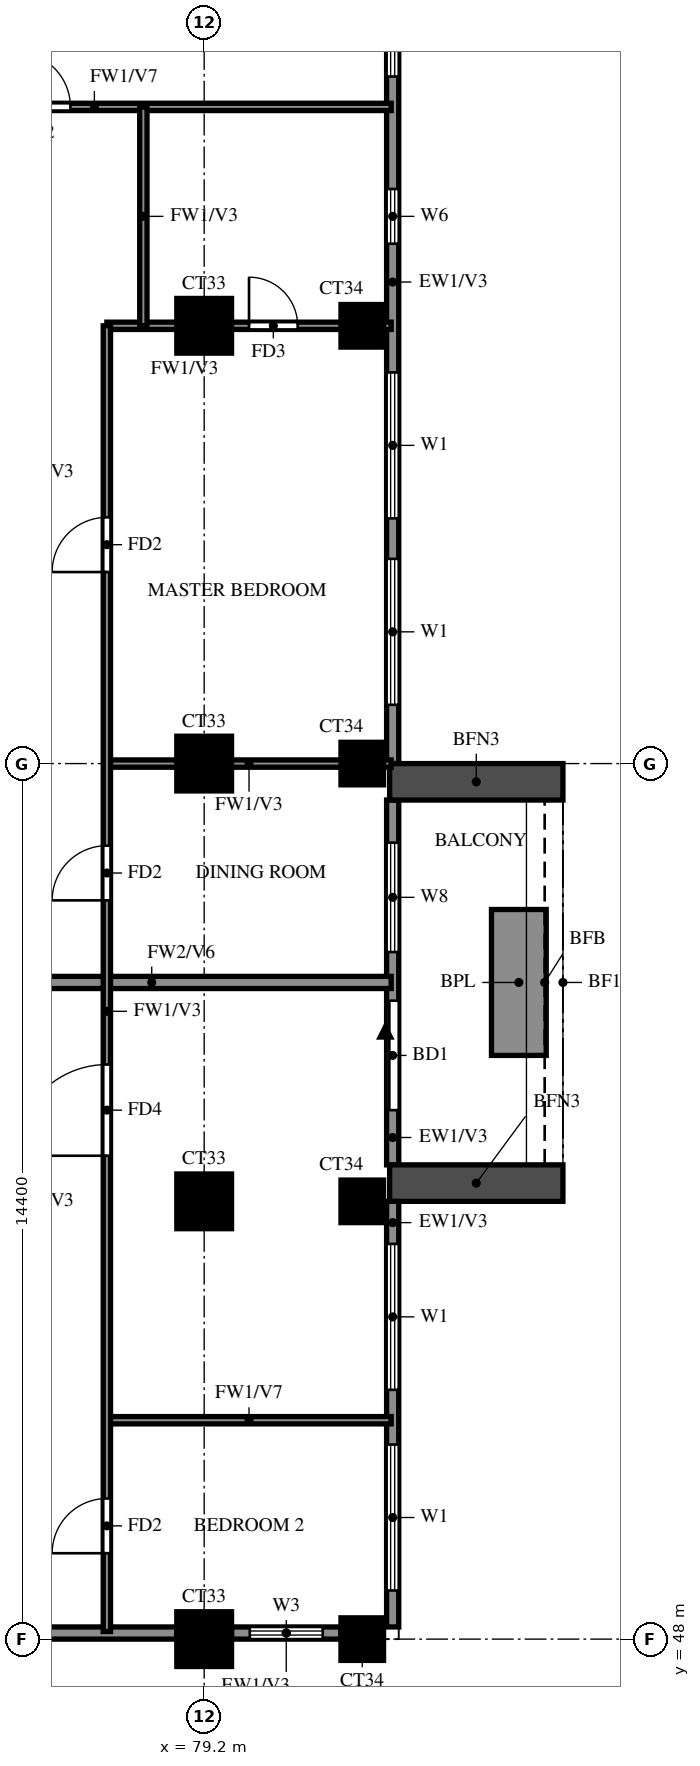
"""IFC4 building model, lengths in metres.
Left out: names, types, materials, properties, quantities, classifications, styles, units other than length and angle.
Written with IfcOpenShell. Run it as: python <this file> out.ifc"""

import sys

from ifc_helpers import new_model, si_unit, direction, frame, frame_2d, origin, origin_2d, place, context, subcontext, project, spatial, rectangle, extrude, source, transform, mapped, element, fill, save


model = new_model("IFC4")
c1 = context("Model", 3, precision=1e-05, world=origin(), true_north=direction((0.0, 1.0)))
c2 = subcontext(c1, "Body", "Model", "MODEL_VIEW")
j1 = project(units=[si_unit("LENGTHUNIT", "METRE"), si_unit("PLANEANGLEUNIT", "RADIAN")], contexts=[c1])
p1 = place(None, origin())
s1 = spatial("IfcSite", under=j1, at=p1, CompositionType="ELEMENT")
p2 = place(p1, origin())
s2 = spatial("IfcBuilding", under=s1, at=p2, CompositionType="ELEMENT")
p3 = place(p2, frame((0.0, 0.0, 218.5)))
s3 = spatial("IfcBuildingStorey", under=s2, at=p3, CompositionType="ELEMENT", Elevation=218.5)
m1 = source(origin(), c2, "Body", "SweptSolid", [
    extrude(rectangle(XDim=0.9, YDim=0.9, at=origin_2d()), origin(), (0.0, 0.0, 1.0), 3.22),
])
p4 = place(p3, frame((79.2, 48.0, 0.0), z_axis=(0.0, 0.0, 1.0), x_axis=(1.0, 0.0, 0.0)))
e1 = element("IfcColumn", 1, at=p4, inside=s3, PredefinedType="COLUMN", context=c2, shape_type="MappedRepresentation", body=[
    mapped(m1, transform((0.0, 0.0, 0.0))),
])
m2 = source(origin(), c2, "Body", "SweptSolid", [
    extrude(rectangle(XDim=0.7, YDim=0.7, at=origin_2d()), origin(), (0.0, 0.0, 1.0), 3.22),
])
p5 = place(p3, frame((81.8, 48.0, 0.0), z_axis=(0.0, 0.0, 1.0), x_axis=(1.0, 0.0, 0.0)))
e2 = element("IfcColumn", 2, at=p5, inside=s3, PredefinedType="COLUMN", context=c2, shape_type="MappedRepresentation", body=[
    mapped(m2, transform((0.0, 0.0, 0.0))),
])
p6 = place(p3, frame((79.2, 55.2, 0.0), z_axis=(0.0, 0.0, 1.0), x_axis=(1.0, 0.0, 0.0)))
e3 = element("IfcColumn", 3, at=p6, inside=s3, PredefinedType="COLUMN", context=c2, shape_type="MappedRepresentation", body=[
    mapped(m1, transform((0.0, 0.0, 0.0))),
])
p7 = place(p3, frame((81.8, 55.2, 0.0), z_axis=(0.0, 0.0, 1.0), x_axis=(1.0, 0.0, 0.0)))
e4 = element("IfcColumn", 4, at=p7, inside=s3, PredefinedType="COLUMN", context=c2, shape_type="MappedRepresentation", body=[
    mapped(m2, transform((0.0, 0.0, 0.0))),
])
p8 = place(p3, frame((79.2, 62.4, 0.0), z_axis=(0.0, 0.0, 1.0), x_axis=(1.0, 0.0, 0.0)))
e5 = element("IfcColumn", 5, at=p8, inside=s3, PredefinedType="COLUMN", context=c2, shape_type="MappedRepresentation", body=[
    mapped(m1, transform((0.0, 0.0, 0.0))),
])
p9 = place(p3, frame((81.8, 62.4, 0.0), z_axis=(0.0, 0.0, 1.0), x_axis=(1.0, 0.0, 0.0)))
e6 = element("IfcColumn", 6, at=p9, inside=s3, PredefinedType="COLUMN", context=c2, shape_type="MappedRepresentation", body=[
    mapped(m2, transform((0.0, 0.0, 0.0))),
])
p10 = place(p3, frame((79.2, 69.6, 0.0), z_axis=(0.0, 0.0, 1.0), x_axis=(1.0, 0.0, 0.0)))
e7 = element("IfcColumn", 7, at=p10, inside=s3, PredefinedType="COLUMN", context=c2, shape_type="MappedRepresentation", body=[
    mapped(m1, transform((0.0, 0.0, 0.0))),
])
p11 = place(p3, frame((81.8, 69.6, 0.0), z_axis=(0.0, 0.0, 1.0), x_axis=(1.0, 0.0, 0.0)))
e8 = element("IfcColumn", 8, at=p11, inside=s3, PredefinedType="COLUMN", context=c2, shape_type="MappedRepresentation", body=[
    mapped(m2, transform((0.0, 0.0, 0.0))),
])
p12 = place(p3, frame((81.907, 39.87, 0.0), z_axis=(0.0, 0.0, 1.0), x_axis=(-0.777936274417, 0.62834318087, 0.0)))
e9 = element("IfcWall", 9, at=p12, inside=s3, PredefinedType="SOLIDWALL", context=c2, shape_type="SweptSolid", body=[
    extrude(rectangle(XDim=13.099, YDim=0.2, at=frame_2d((6.549, 0.0))), origin(), (0.0, 0.0, 1.0), 3.22),
])
p13 = place(p12, frame((9.938, 0.0, 1.5)))
e10 = element("IfcOpeningElement", 10, at=p13, cuts=e9, PredefinedType="OPENING", context=c2, shape_type="SweptSolid", body=[
    extrude(rectangle(XDim=0.9, YDim=0.9, at=frame_2d((0.45, 0.45))), frame((0.0, 0.11, 0.0), z_axis=(0.0, -1.0, 0.0), x_axis=(1.0, 0.0, 0.0)), (0.0, 0.0, 1.0), 0.22),
])
p14 = place(p3, frame((71.987, 48.1, 0.0), z_axis=(0.0, 0.0, 1.0), x_axis=(1.0, 0.0, 0.0)))
e11 = element("IfcWall", 11, at=p14, inside=s3, PredefinedType="SOLIDWALL", context=c2, shape_type="SweptSolid", body=[
    extrude(rectangle(XDim=6.763, YDim=0.2, at=frame_2d((3.381, 0.0))), origin(), (0.0, 0.0, 1.0), 3.22),
])
p15 = place(p3, frame((79.65, 48.1, 0.0), z_axis=(0.0, 0.0, 1.0), x_axis=(1.0, 0.0, 0.0)))
e12 = element("IfcWall", 12, at=p15, inside=s3, PredefinedType="SOLIDWALL", context=c2, shape_type="SweptSolid", body=[
    extrude(rectangle(XDim=1.8, YDim=0.2, at=frame_2d((0.9, 0.0))), origin(), (0.0, 0.0, 1.0), 3.22),
])
p16 = place(p15, frame((0.3, 0.0, 0.6)))
e13 = element("IfcOpeningElement", 13, at=p16, cuts=e12, PredefinedType="OPENING", context=c2, shape_type="SweptSolid", body=[
    extrude(rectangle(XDim=1.2, YDim=2.4, at=frame_2d((0.6, 1.2))), frame((0.0, 0.11, 0.0), z_axis=(0.0, -1.0, 0.0), x_axis=(1.0, 0.0, 0.0)), (0.0, 0.0, 1.0), 0.22),
])
p17 = place(p3, frame((82.3, 48.2, 0.0), z_axis=(0.0, 0.0, 1.0), x_axis=(0.0, 1.0, 0.0)))
e14 = element("IfcWall", 14, at=p17, inside=s3, PredefinedType="SOLIDWALL", context=c2, shape_type="SweptSolid", body=[
    extrude(rectangle(XDim=7.0, YDim=0.2, at=frame_2d((3.5, 0.0))), origin(), (0.0, 0.0, 1.0), 3.22),
])
p18 = place(p17, frame((0.6, 0.0, 0.6)))
e15 = element("IfcOpeningElement", 15, at=p18, cuts=e14, PredefinedType="OPENING", context=c2, shape_type="SweptSolid", body=[
    extrude(rectangle(XDim=2.4, YDim=2.4, at=frame_2d((1.2, 1.2))), frame((0.0, 0.11, 0.0), z_axis=(0.0, -1.0, 0.0), x_axis=(1.0, 0.0, 0.0)), (0.0, 0.0, 1.0), 0.22),
])
p19 = place(p17, frame((3.9, 0.0, 0.6)))
e16 = element("IfcOpeningElement", 16, at=p19, cuts=e14, PredefinedType="OPENING", context=c2, shape_type="SweptSolid", body=[
    extrude(rectangle(XDim=2.4, YDim=2.4, at=frame_2d((1.2, 1.2))), frame((0.0, 0.11, 0.0), z_axis=(0.0, -1.0, 0.0), x_axis=(1.0, 0.0, 0.0)), (0.0, 0.0, 1.0), 0.22),
])
p20 = place(p3, frame((82.3, 55.8, 0.0), z_axis=(0.0, 0.0, 1.0), x_axis=(0.0, 1.0, 0.0)))
e17 = element("IfcWall", 17, at=p20, inside=s3, PredefinedType="SOLIDWALL", context=c2, shape_type="SweptSolid", body=[
    extrude(rectangle(XDim=6.0, YDim=0.2, at=frame_2d((3.0, 0.0))), origin(), (0.0, 0.0, 1.0), 3.22),
])
p21 = place(p20, frame((0.9, 0.0, 0.0)))
e18 = element("IfcOpeningElement", 18, at=p21, cuts=e17, PredefinedType="OPENING", context=c2, shape_type="SweptSolid", body=[
    extrude(rectangle(XDim=1.8, YDim=2.4, at=frame_2d((0.9, 1.2))), frame((0.0, 0.11, 0.0), z_axis=(0.0, -1.0, 0.0), x_axis=(1.0, 0.0, 0.0)), (0.0, 0.0, 1.0), 0.22),
])
p22 = place(p20, frame((3.5, 0.0, 0.6)))
e19 = element("IfcOpeningElement", 19, at=p22, cuts=e17, PredefinedType="OPENING", context=c2, shape_type="SweptSolid", body=[
    extrude(rectangle(XDim=1.8, YDim=2.4, at=frame_2d((0.9, 1.2))), frame((0.0, 0.11, 0.0), z_axis=(0.0, -1.0, 0.0), x_axis=(1.0, 0.0, 0.0)), (0.0, 0.0, 1.0), 0.22),
])
p23 = place(p3, frame((82.3, 62.4, 0.0), z_axis=(0.0, 0.0, 1.0), x_axis=(0.0, 1.0, 0.0)))
e20 = element("IfcWall", 20, at=p23, inside=s3, PredefinedType="SOLIDWALL", context=c2, shape_type="SweptSolid", body=[
    extrude(rectangle(XDim=14.4, YDim=0.2, at=frame_2d((7.2, 0.0))), origin(), (0.0, 0.0, 1.0), 3.22),
])
p24 = place(p23, frame((0.967, 0.0, 0.6)))
e21 = element("IfcOpeningElement", 21, at=p24, cuts=e20, PredefinedType="OPENING", context=c2, shape_type="SweptSolid", body=[
    extrude(rectangle(XDim=2.4, YDim=2.4, at=frame_2d((1.2, 1.2))), frame((0.0, 0.11, 0.0), z_axis=(0.0, -1.0, 0.0), x_axis=(1.0, 0.0, 0.0)), (0.0, 0.0, 1.0), 0.22),
])
p25 = place(p23, frame((4.033, 0.0, 0.6)))
e22 = element("IfcOpeningElement", 22, at=p25, cuts=e20, PredefinedType="OPENING", context=c2, shape_type="SweptSolid", body=[
    extrude(rectangle(XDim=2.4, YDim=2.4, at=frame_2d((1.2, 1.2))), frame((0.0, 0.11, 0.0), z_axis=(0.0, -1.0, 0.0), x_axis=(1.0, 0.0, 0.0)), (0.0, 0.0, 1.0), 0.22),
])
p26 = place(p23, frame((8.55, 0.0, 1.5)))
e23 = element("IfcOpeningElement", 23, at=p26, cuts=e20, PredefinedType="OPENING", context=c2, shape_type="SweptSolid", body=[
    extrude(rectangle(XDim=0.9, YDim=0.9, at=frame_2d((0.45, 0.45))), frame((0.0, 0.11, 0.0), z_axis=(0.0, -1.0, 0.0), x_axis=(1.0, 0.0, 0.0)), (0.0, 0.0, 1.0), 0.22),
])
p27 = place(p23, frame((11.3, 0.0, 0.6)))
e24 = element("IfcOpeningElement", 24, at=p27, cuts=e20, PredefinedType="OPENING", context=c2, shape_type="SweptSolid", body=[
    extrude(rectangle(XDim=2.4, YDim=2.4, at=frame_2d((1.2, 1.2))), frame((0.0, 0.11, 0.0), z_axis=(0.0, -1.0, 0.0), x_axis=(1.0, 0.0, 0.0)), (0.0, 0.0, 1.0), 0.22),
])
for number, where, z_axis, x_axis in (
    (25, (82.25, 55.5, 0.0), (0.0, 0.0, 1.0), (1.0, 0.0, 0.0)),
    (26, (82.25, 62.1, 0.0), (0.0, 0.0, 1.0), (1.0, 0.0, 0.0)),
):
    element("IfcWall", number, at=place(p3, frame(where, z_axis=z_axis, x_axis=x_axis)), inside=s3, PredefinedType="SOLIDWALL", context=c2, shape_type="SweptSolid", body=[
        extrude(rectangle(XDim=2.85, YDim=0.6, at=frame_2d((1.425, 0.0))), origin(), (0.0, 0.0, 1.0), 2.85),
    ])
p28 = place(p3, frame((84.375, 57.6, 0.0), z_axis=(0.0, 0.0, 1.0), x_axis=(0.0, 1.0, 0.0)))
e27 = element("IfcWall", 27, at=p28, inside=s3, PredefinedType="SOLIDWALL", context=c2, shape_type="SweptSolid", body=[
    extrude(rectangle(XDim=2.4, YDim=0.9, at=frame_2d((1.2, 0.0))), origin(), (0.0, 0.0, 1.0), 0.9),
])
p29 = place(p3, frame((74.4, 58.8, 0.0), z_axis=(0.0, 0.0, 1.0), x_axis=(1.0, 0.0, 0.0)))
e28 = element("IfcWall", 28, at=p29, inside=s3, PredefinedType="SOLIDWALL", context=c2, shape_type="SweptSolid", body=[
    extrude(rectangle(XDim=7.875, YDim=0.2, at=frame_2d((3.938, 0.0))), origin(), (0.0, 0.0, 1.0), 2.32),
])
p30 = place(p3, frame((77.6, 51.6, 0.0), z_axis=(0.0, 0.0, 1.0), x_axis=(1.0, 0.0, 0.0)))
e29 = element("IfcWall", 29, at=p30, inside=s3, PredefinedType="PARTITIONING", context=c2, shape_type="SweptSolid", body=[
    extrude(rectangle(XDim=4.675, YDim=0.12, at=frame_2d((2.337, 0.0))), origin(), (0.0, 0.0, 1.0), 2.32),
])
p31 = place(p3, frame((77.6, 62.4, 0.0), z_axis=(0.0, 0.0, 1.0), x_axis=(1.0, 0.0, 0.0)))
e30 = element("IfcWall", 30, at=p31, inside=s3, PredefinedType="PARTITIONING", context=c2, shape_type="SweptSolid", body=[
    extrude(rectangle(XDim=4.675, YDim=0.12, at=frame_2d((2.337, 0.0))), origin(), (0.0, 0.0, 1.0), 3.22),
])
p32 = place(p3, frame((77.6, 69.6, 0.0), z_axis=(0.0, 0.0, 1.0), x_axis=(1.0, 0.0, 0.0)))
e31 = element("IfcWall", 31, at=p32, inside=s3, PredefinedType="PARTITIONING", context=c2, shape_type="SweptSolid", body=[
    extrude(rectangle(XDim=4.675, YDim=0.12, at=frame_2d((2.337, 0.0))), origin(), (0.0, 0.0, 1.0), 3.22),
])
p33 = place(p32, frame((2.337, 0.0, 0.0)))
e32 = element("IfcOpeningElement", 32, at=p33, cuts=e31, PredefinedType="OPENING", context=c2, shape_type="SweptSolid", body=[
    extrude(rectangle(XDim=0.8, YDim=2.1, at=frame_2d((0.4, 1.05))), frame((0.0, 0.07, 0.0), z_axis=(0.0, -1.0, 0.0), x_axis=(1.0, 0.0, 0.0)), (0.0, 0.0, 1.0), 0.14),
])
p34 = place(p3, frame((72.0, 73.2, 0.0), z_axis=(0.0, 0.0, 1.0), x_axis=(1.0, 0.0, 0.0)))
e33 = element("IfcWall", 33, at=p34, inside=s3, PredefinedType="PARTITIONING", context=c2, shape_type="SweptSolid", body=[
    extrude(rectangle(XDim=10.275, YDim=0.12, at=frame_2d((5.137, 0.0))), origin(), (0.0, 0.0, 1.0), 2.32),
])
p35 = place(p34, frame((4.1, 0.0, 0.0)))
e34 = element("IfcOpeningElement", 34, at=p35, cuts=e33, PredefinedType="OPENING", context=c2, shape_type="SweptSolid", body=[
    extrude(rectangle(XDim=0.9, YDim=2.1, at=frame_2d((0.45, 1.05))), frame((0.0, 0.07, 0.0), z_axis=(0.0, -1.0, 0.0), x_axis=(1.0, 0.0, 0.0)), (0.0, 0.0, 1.0), 0.14),
])
p36 = place(p3, frame((77.6, 48.125, 0.0), z_axis=(0.0, 0.0, 1.0), x_axis=(0.0, 1.0, 0.0)))
e35 = element("IfcWall", 35, at=p36, inside=s3, PredefinedType="PARTITIONING", context=c2, shape_type="SweptSolid", body=[
    extrude(rectangle(XDim=21.475, YDim=0.12, at=frame_2d((10.738, 0.0))), origin(), (0.0, 0.0, 1.0), 3.22),
])
p37 = place(p36, frame((1.288, 0.0, 0.0)))
e36 = element("IfcOpeningElement", 36, at=p37, cuts=e35, PredefinedType="OPENING", context=c2, shape_type="SweptSolid", body=[
    extrude(rectangle(XDim=0.9, YDim=2.1, at=frame_2d((0.45, 1.05))), frame((0.0, 0.07, 0.0), z_axis=(0.0, -1.0, 0.0), x_axis=(1.0, 0.0, 0.0)), (0.0, 0.0, 1.0), 0.14),
])
p38 = place(p36, frame((7.825, 0.0, 0.0)))
e37 = element("IfcOpeningElement", 37, at=p38, cuts=e35, PredefinedType="OPENING", context=c2, shape_type="SweptSolid", body=[
    extrude(rectangle(XDim=1.5, YDim=2.1, at=frame_2d((0.75, 1.05))), frame((0.0, 0.07, 0.0), z_axis=(0.0, -1.0, 0.0), x_axis=(1.0, 0.0, 0.0)), (0.0, 0.0, 1.0), 0.14),
])
p39 = place(p36, frame((12.025, 0.0, 0.0)))
e38 = element("IfcOpeningElement", 38, at=p39, cuts=e35, PredefinedType="OPENING", context=c2, shape_type="SweptSolid", body=[
    extrude(rectangle(XDim=0.9, YDim=2.1, at=frame_2d((0.45, 1.05))), frame((0.0, 0.07, 0.0), z_axis=(0.0, -1.0, 0.0), x_axis=(1.0, 0.0, 0.0)), (0.0, 0.0, 1.0), 0.14),
])
p40 = place(p36, frame((17.425, 0.0, 0.0)))
e39 = element("IfcOpeningElement", 39, at=p40, cuts=e35, PredefinedType="OPENING", context=c2, shape_type="SweptSolid", body=[
    extrude(rectangle(XDim=0.9, YDim=2.1, at=frame_2d((0.45, 1.05))), frame((0.0, 0.07, 0.0), z_axis=(0.0, -1.0, 0.0), x_axis=(1.0, 0.0, 0.0)), (0.0, 0.0, 1.0), 0.14),
])
p41 = place(p3, frame((78.2, 69.6, 0.0), z_axis=(0.0, 0.0, 1.0), x_axis=(0.0, 1.0, 0.0)))
e40 = element("IfcWall", 40, at=p41, inside=s3, PredefinedType="PARTITIONING", context=c2, shape_type="SweptSolid", body=[
    extrude(rectangle(XDim=3.6, YDim=0.12, at=frame_2d((1.8, 0.0))), origin(), (0.0, 0.0, 1.0), 3.22),
])
p42 = place(p16, origin())
e41 = element("IfcWindow", 41, at=p42, inside=s3, PartitioningType="SINGLE_PANEL", PredefinedType="WINDOW", context=c2, shape_type="SweptSolid", body=[
    extrude(rectangle(XDim=1.2, YDim=2.4, at=frame_2d((0.6, 1.2))), frame((0.0, 0.03, 0.0), z_axis=(0.0, -1.0, 0.0), x_axis=(1.0, 0.0, 0.0)), (0.0, 0.0, 1.0), 0.06),
])
fill(e13, e41)
p43 = place(p18, origin())
e42 = element("IfcWindow", 42, at=p43, inside=s3, PartitioningType="DOUBLE_PANEL_VERTICAL", PredefinedType="WINDOW", context=c2, shape_type="SweptSolid", body=[
    extrude(rectangle(XDim=2.4, YDim=2.4, at=frame_2d((1.2, 1.2))), frame((0.0, 0.03, 0.0), z_axis=(0.0, -1.0, 0.0), x_axis=(1.0, 0.0, 0.0)), (0.0, 0.0, 1.0), 0.06),
])
fill(e15, e42)
p44 = place(p19, origin())
e43 = element("IfcWindow", 43, at=p44, inside=s3, PartitioningType="DOUBLE_PANEL_VERTICAL", PredefinedType="WINDOW", context=c2, shape_type="SweptSolid", body=[
    extrude(rectangle(XDim=2.4, YDim=2.4, at=frame_2d((1.2, 1.2))), frame((0.0, 0.03, 0.0), z_axis=(0.0, -1.0, 0.0), x_axis=(1.0, 0.0, 0.0)), (0.0, 0.0, 1.0), 0.06),
])
fill(e16, e43)
p45 = place(p21, origin())
e44 = element("IfcDoor", 44, at=p45, inside=s3, OperationType="DOUBLE_DOOR_SLIDING", PredefinedType="DOOR", context=c2, shape_type="SweptSolid", body=[
    extrude(rectangle(XDim=1.8, YDim=2.4, at=frame_2d((0.9, 1.2))), frame((0.0, 0.025, 0.0), z_axis=(0.0, -1.0, 0.0), x_axis=(1.0, 0.0, 0.0)), (0.0, 0.0, 1.0), 0.05),
])
fill(e18, e44)
p46 = place(p22, origin())
e45 = element("IfcWindow", 45, at=p46, inside=s3, PartitioningType="DOUBLE_PANEL_VERTICAL", PredefinedType="WINDOW", context=c2, shape_type="SweptSolid", body=[
    extrude(rectangle(XDim=1.8, YDim=2.4, at=frame_2d((0.9, 1.2))), frame((0.0, 0.03, 0.0), z_axis=(0.0, -1.0, 0.0), x_axis=(1.0, 0.0, 0.0)), (0.0, 0.0, 1.0), 0.06),
])
fill(e19, e45)
p47 = place(p24, origin())
e46 = element("IfcWindow", 46, at=p47, inside=s3, PartitioningType="DOUBLE_PANEL_VERTICAL", PredefinedType="WINDOW", context=c2, shape_type="SweptSolid", body=[
    extrude(rectangle(XDim=2.4, YDim=2.4, at=frame_2d((1.2, 1.2))), frame((0.0, 0.03, 0.0), z_axis=(0.0, -1.0, 0.0), x_axis=(1.0, 0.0, 0.0)), (0.0, 0.0, 1.0), 0.06),
])
fill(e21, e46)
p48 = place(p25, origin())
e47 = element("IfcWindow", 47, at=p48, inside=s3, PartitioningType="DOUBLE_PANEL_VERTICAL", PredefinedType="WINDOW", context=c2, shape_type="SweptSolid", body=[
    extrude(rectangle(XDim=2.4, YDim=2.4, at=frame_2d((1.2, 1.2))), frame((0.0, 0.03, 0.0), z_axis=(0.0, -1.0, 0.0), x_axis=(1.0, 0.0, 0.0)), (0.0, 0.0, 1.0), 0.06),
])
fill(e22, e47)
p49 = place(p26, origin())
e48 = element("IfcWindow", 48, at=p49, inside=s3, PartitioningType="SINGLE_PANEL", PredefinedType="WINDOW", context=c2, shape_type="SweptSolid", body=[
    extrude(rectangle(XDim=0.9, YDim=0.9, at=frame_2d((0.45, 0.45))), frame((0.0, 0.03, 0.0), z_axis=(0.0, -1.0, 0.0), x_axis=(1.0, 0.0, 0.0)), (0.0, 0.0, 1.0), 0.06),
])
fill(e23, e48)
p50 = place(p27, origin())
e49 = element("IfcWindow", 49, at=p50, inside=s3, PartitioningType="DOUBLE_PANEL_VERTICAL", PredefinedType="WINDOW", context=c2, shape_type="SweptSolid", body=[
    extrude(rectangle(XDim=2.4, YDim=2.4, at=frame_2d((1.2, 1.2))), frame((0.0, 0.03, 0.0), z_axis=(0.0, -1.0, 0.0), x_axis=(1.0, 0.0, 0.0)), (0.0, 0.0, 1.0), 0.06),
])
fill(e24, e49)
p51 = place(p37, origin())
e50 = element("IfcDoor", 50, at=p51, inside=s3, OperationType="SINGLE_SWING_RIGHT", PredefinedType="DOOR", context=c2, shape_type="SweptSolid", body=[
    extrude(rectangle(XDim=0.9, YDim=2.1, at=frame_2d((0.45, 1.05))), frame((0.0, 0.025, 0.0), z_axis=(0.0, -1.0, 0.0), x_axis=(1.0, 0.0, 0.0)), (0.0, 0.0, 1.0), 0.05),
])
fill(e36, e50)
p52 = place(p38, origin())
e51 = element("IfcDoor", 51, at=p52, inside=s3, OperationType="SINGLE_SWING_RIGHT", PredefinedType="DOOR", context=c2, shape_type="SweptSolid", body=[
    extrude(rectangle(XDim=1.5, YDim=2.1, at=frame_2d((0.75, 1.05))), frame((0.0, 0.025, 0.0), z_axis=(0.0, -1.0, 0.0), x_axis=(1.0, 0.0, 0.0)), (0.0, 0.0, 1.0), 0.05),
])
fill(e37, e51)
p53 = place(p39, origin())
e52 = element("IfcDoor", 52, at=p53, inside=s3, OperationType="SINGLE_SWING_LEFT", PredefinedType="DOOR", context=c2, shape_type="SweptSolid", body=[
    extrude(rectangle(XDim=0.9, YDim=2.1, at=frame_2d((0.45, 1.05))), frame((0.0, 0.025, 0.0), z_axis=(0.0, -1.0, 0.0), x_axis=(1.0, 0.0, 0.0)), (0.0, 0.0, 1.0), 0.05),
])
fill(e38, e52)
p54 = place(p40, origin())
e53 = element("IfcDoor", 53, at=p54, inside=s3, OperationType="SINGLE_SWING_RIGHT", PredefinedType="DOOR", context=c2, shape_type="SweptSolid", body=[
    extrude(rectangle(XDim=0.9, YDim=2.1, at=frame_2d((0.45, 1.05))), frame((0.0, 0.025, 0.0), z_axis=(0.0, -1.0, 0.0), x_axis=(1.0, 0.0, 0.0)), (0.0, 0.0, 1.0), 0.05),
])
fill(e39, e53)
p55 = place(p33, origin())
e54 = element("IfcDoor", 54, at=p55, inside=s3, OperationType="SINGLE_SWING_RIGHT", PredefinedType="DOOR", context=c2, shape_type="SweptSolid", body=[
    extrude(rectangle(XDim=0.8, YDim=2.1, at=frame_2d((0.4, 1.05))), frame((0.0, 0.025, 0.0), z_axis=(0.0, -1.0, 0.0), x_axis=(1.0, 0.0, 0.0)), (0.0, 0.0, 1.0), 0.05),
])
fill(e32, e54)
p56 = place(p35, origin())
e55 = element("IfcDoor", 55, at=p56, inside=s3, OperationType="SINGLE_SWING_LEFT", PredefinedType="DOOR", context=c2, shape_type="SweptSolid", body=[
    extrude(rectangle(XDim=0.9, YDim=2.1, at=frame_2d((0.45, 1.05))), frame((0.0, 0.025, 0.0), z_axis=(0.0, -1.0, 0.0), x_axis=(1.0, 0.0, 0.0)), (0.0, 0.0, 1.0), 0.05),
])
fill(e34, e55)
save(model, sys.argv[1])
